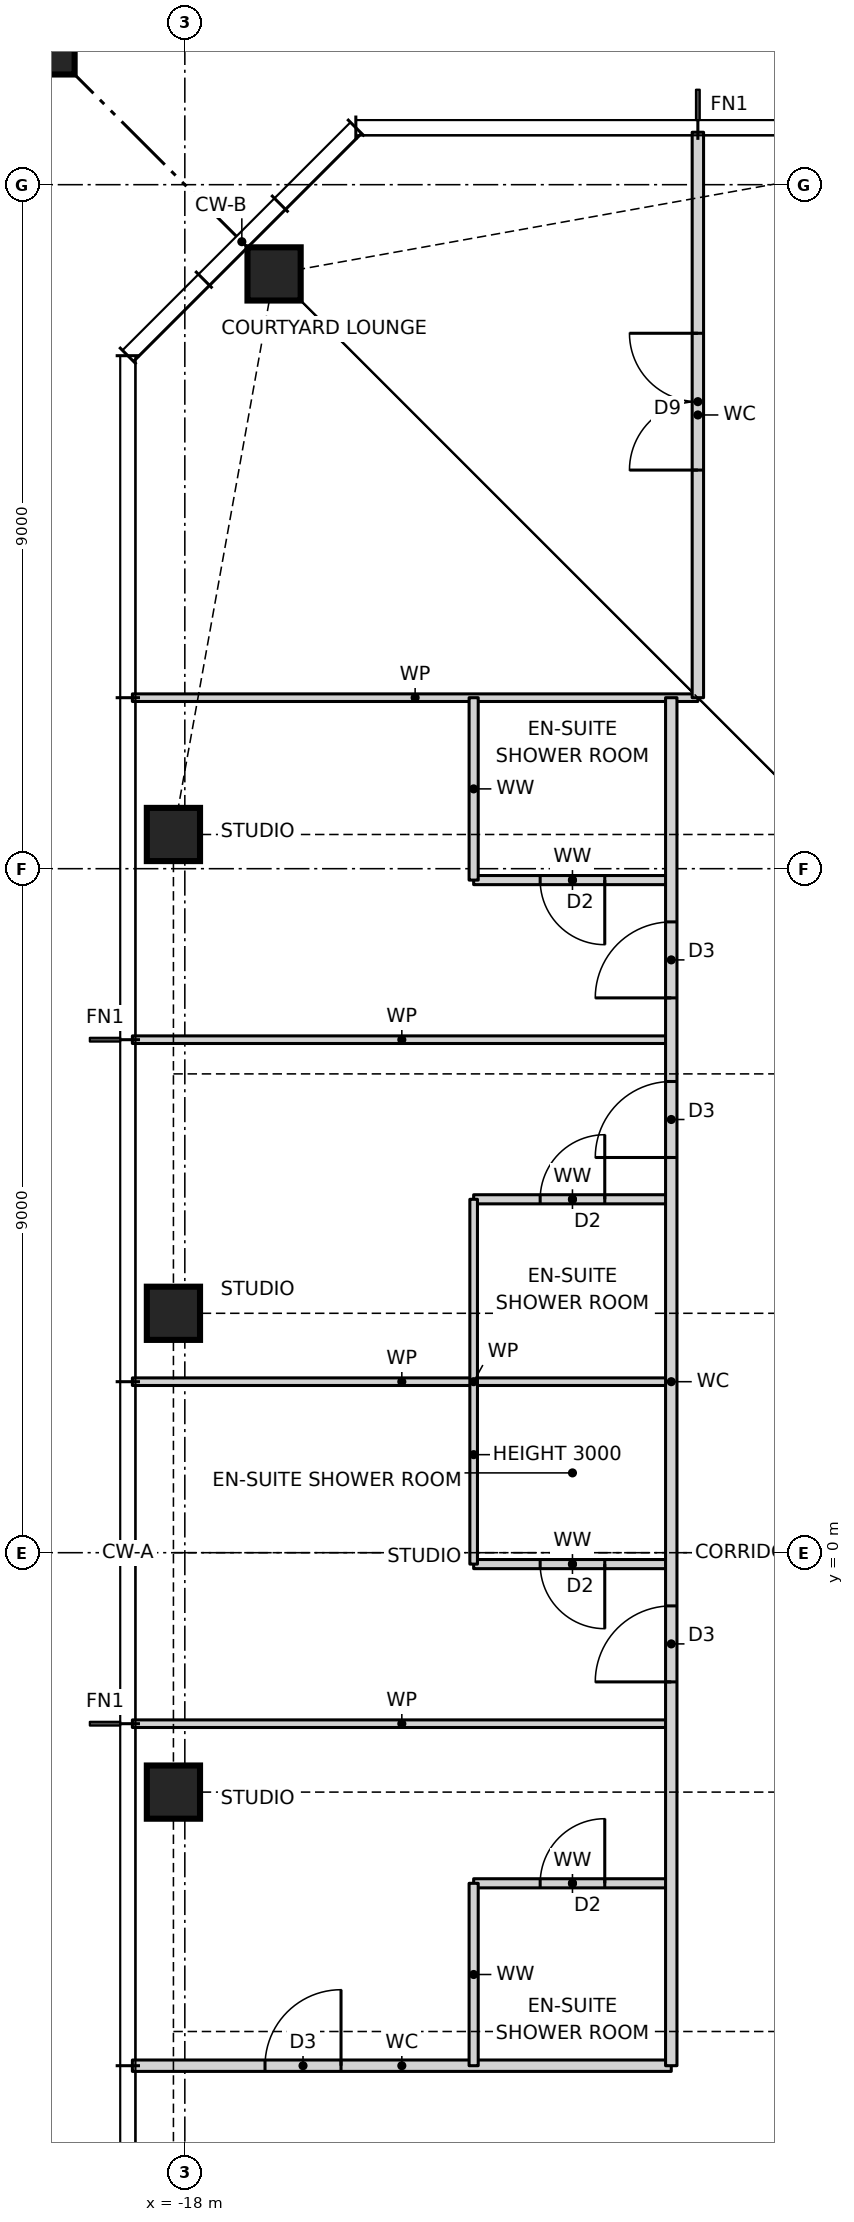
"""IFC4 building model, lengths in metres.
Left out: names, types, materials, properties, quantities, classifications, styles, units other than length and angle.
Written with IfcOpenShell. Run it as: python <this file> out.ifc"""

import sys

from ifc_helpers import new_model, si_unit, direction, frame, frame_2d, origin, origin_2d, place, context, subcontext, project, spatial, rectangle, hollow_rectangle, i_section, extrude, element, fill, save


model = new_model("IFC4")
c1 = context("Model", 3, precision=1e-05, world=origin(), true_north=direction((0.0, 1.0)))
c2 = subcontext(c1, "Body", "Model", "MODEL_VIEW")
j1 = project(units=[si_unit("LENGTHUNIT", "METRE"), si_unit("PLANEANGLEUNIT", "RADIAN")], contexts=[c1])
p1 = place(None, origin())
s1 = spatial("IfcSite", under=j1, at=p1, CompositionType="ELEMENT")
p2 = place(p1, origin())
s2 = spatial("IfcBuilding", under=s1, at=p2, CompositionType="ELEMENT")
p3 = place(p2, frame((0.0, 0.0, 153.0)))
s3 = spatial("IfcBuildingStorey", under=s2, at=p3, CompositionType="ELEMENT", Elevation=153.0)
for number, where, z_axis, x_axis in (
    (1, (-16.826, 16.826, 0.0), (0.0, 0.0, 1.0), (1.0, 0.0, 0.0)),
    (2, (-18.15, 9.45, 0.0), (0.0, 0.0, 1.0), (1.0, 0.0, 0.0)),
    (3, (-18.15, 3.15, 0.0), (0.0, 0.0, 1.0), (1.0, 0.0, 0.0)),
    (4, (-18.15, -3.15, 0.0), (0.0, 0.0, 1.0), (1.0, 0.0, 0.0)),
):
    element("IfcColumn", number, at=place(p3, frame(where, z_axis=z_axis, x_axis=x_axis)), inside=s3, PredefinedType="COLUMN", context=c2, shape_type="SweptSolid", body=[
        extrude(hollow_rectangle(XDim=0.7, YDim=0.7, WallThickness=0.06, at=origin_2d()), origin(), (0.0, 0.0, 1.0), 3.5),
    ])
p4 = place(p3, frame((-21.65, 21.65, 0.0), z_axis=(0.0, 0.0, 1.0), x_axis=(1.0, 0.0, 0.0)))
e5 = element("IfcColumn", 5, at=p4, inside=s3, PredefinedType="COLUMN", context=c2, shape_type="SweptSolid", body=[
    extrude(rectangle(XDim=4.4, YDim=4.4, at=origin_2d()), origin(), (0.0, 0.0, 1.0), 3.5),
    extrude(i_section(OverallWidth=0.478, OverallDepth=0.599, WebThickness=0.1, FlangeThickness=0.14, at=origin_2d()), origin(), (0.0, 0.0, 1.0), 3.5),
])
p5 = place(p3, frame((-18.69, -6.75, 0.0), z_axis=(0.0, 0.0, 1.0), x_axis=(1.0, 0.0, 0.0)))
e6 = element("IfcWall", 6, at=p5, inside=s3, PredefinedType="PARTITIONING", context=c2, shape_type="SweptSolid", body=[
    extrude(rectangle(XDim=7.09, YDim=0.15, at=frame_2d((3.545, 0.0))), origin(), (0.0, 0.0, 1.0), 3.27),
])
p6 = place(p5, frame((1.745, 0.0, 0.0)))
e7 = element("IfcOpeningElement", 7, at=p6, cuts=e6, PredefinedType="OPENING", context=c2, shape_type="SweptSolid", body=[
    extrude(rectangle(XDim=1.0, YDim=2.1, at=frame_2d((0.5, 1.05))), frame((0.0, 0.085, 0.0), z_axis=(0.0, -1.0, 0.0), x_axis=(1.0, 0.0, 0.0)), (0.0, 0.0, 1.0), 0.17),
])
p7 = place(p3, frame((-14.2, -4.35, 0.0), z_axis=(0.0, 0.0, 1.0), x_axis=(1.0, 0.0, 0.0)))
e8 = element("IfcWall", 8, at=p7, inside=s3, PredefinedType="PARTITIONING", context=c2, shape_type="SweptSolid", body=[
    extrude(rectangle(XDim=2.6, YDim=0.12, at=frame_2d((1.3, 0.0))), origin(), (0.0, 0.0, 1.0), 3.27),
])
p8 = place(p7, frame((0.875, 0.0, 0.0)))
e9 = element("IfcOpeningElement", 9, at=p8, cuts=e8, PredefinedType="OPENING", context=c2, shape_type="SweptSolid", body=[
    extrude(rectangle(XDim=0.85, YDim=2.1, at=frame_2d((0.425, 1.05))), frame((0.0, 0.07, 0.0), z_axis=(0.0, -1.0, 0.0), x_axis=(1.0, 0.0, 0.0)), (0.0, 0.0, 1.0), 0.14),
])
p9 = place(p3, frame((-18.69, -2.25, 0.0), z_axis=(0.0, 0.0, 1.0), x_axis=(1.0, 0.0, 0.0)))
e10 = element("IfcWall", 10, at=p9, inside=s3, PredefinedType="PARTITIONING", context=c2, shape_type="SweptSolid", body=[
    extrude(rectangle(XDim=7.09, YDim=0.1, at=frame_2d((3.545, 0.0))), origin(), (0.0, 0.0, 1.0), 3.27),
])
p10 = place(p3, frame((-14.2, -0.15, 0.0), z_axis=(0.0, 0.0, 1.0), x_axis=(1.0, 0.0, 0.0)))
e11 = element("IfcWall", 11, at=p10, inside=s3, PredefinedType="PARTITIONING", context=c2, shape_type="SweptSolid", body=[
    extrude(rectangle(XDim=2.6, YDim=0.12, at=frame_2d((1.3, 0.0))), origin(), (0.0, 0.0, 1.0), 3.27),
])
p11 = place(p10, frame((0.875, 0.0, 0.0)))
e12 = element("IfcOpeningElement", 12, at=p11, cuts=e11, PredefinedType="OPENING", context=c2, shape_type="SweptSolid", body=[
    extrude(rectangle(XDim=0.85, YDim=2.1, at=frame_2d((0.425, 1.05))), frame((0.0, 0.07, 0.0), z_axis=(0.0, -1.0, 0.0), x_axis=(1.0, 0.0, 0.0)), (0.0, 0.0, 1.0), 0.14),
])
p12 = place(p3, frame((-18.69, 2.25, 0.0), z_axis=(0.0, 0.0, 1.0), x_axis=(1.0, 0.0, 0.0)))
e13 = element("IfcWall", 13, at=p12, inside=s3, PredefinedType="PARTITIONING", context=c2, shape_type="SweptSolid", body=[
    extrude(rectangle(XDim=7.09, YDim=0.1, at=frame_2d((3.545, 0.0))), origin(), (0.0, 0.0, 1.0), 3.27),
])
p13 = place(p3, frame((-14.2, 4.65, 0.0), z_axis=(0.0, 0.0, 1.0), x_axis=(1.0, 0.0, 0.0)))
e14 = element("IfcWall", 14, at=p13, inside=s3, PredefinedType="PARTITIONING", context=c2, shape_type="SweptSolid", body=[
    extrude(rectangle(XDim=2.6, YDim=0.12, at=frame_2d((1.3, 0.0))), origin(), (0.0, 0.0, 1.0), 3.27),
])
p14 = place(p13, frame((0.875, 0.0, 0.0)))
e15 = element("IfcOpeningElement", 15, at=p14, cuts=e14, PredefinedType="OPENING", context=c2, shape_type="SweptSolid", body=[
    extrude(rectangle(XDim=0.85, YDim=2.1, at=frame_2d((0.425, 1.05))), frame((0.0, 0.07, 0.0), z_axis=(0.0, -1.0, 0.0), x_axis=(1.0, 0.0, 0.0)), (0.0, 0.0, 1.0), 0.14),
])
p15 = place(p3, frame((-18.69, 6.75, 0.0), z_axis=(0.0, 0.0, 1.0), x_axis=(1.0, 0.0, 0.0)))
e16 = element("IfcWall", 16, at=p15, inside=s3, PredefinedType="PARTITIONING", context=c2, shape_type="SweptSolid", body=[
    extrude(rectangle(XDim=7.09, YDim=0.1, at=frame_2d((3.545, 0.0))), origin(), (0.0, 0.0, 1.0), 3.27),
])
p16 = place(p3, frame((-14.2, 8.85, 0.0), z_axis=(0.0, 0.0, 1.0), x_axis=(1.0, 0.0, 0.0)))
e17 = element("IfcWall", 17, at=p16, inside=s3, PredefinedType="PARTITIONING", context=c2, shape_type="SweptSolid", body=[
    extrude(rectangle(XDim=2.6, YDim=0.12, at=frame_2d((1.3, 0.0))), origin(), (0.0, 0.0, 1.0), 3.27),
])
p17 = place(p16, frame((0.875, 0.0, 0.0)))
e18 = element("IfcOpeningElement", 18, at=p17, cuts=e17, PredefinedType="OPENING", context=c2, shape_type="SweptSolid", body=[
    extrude(rectangle(XDim=0.85, YDim=2.1, at=frame_2d((0.425, 1.05))), frame((0.0, 0.07, 0.0), z_axis=(0.0, -1.0, 0.0), x_axis=(1.0, 0.0, 0.0)), (0.0, 0.0, 1.0), 0.14),
])
p18 = place(p3, frame((-18.69, 11.25, 0.0), z_axis=(0.0, 0.0, 1.0), x_axis=(1.0, 0.0, 0.0)))
e19 = element("IfcWall", 19, at=p18, inside=s3, PredefinedType="PARTITIONING", context=c2, shape_type="SweptSolid", body=[
    extrude(rectangle(XDim=7.44, YDim=0.1, at=frame_2d((3.72, 0.0))), origin(), (0.0, 0.0, 1.0), 3.27),
])
p19 = place(p3, frame((-11.25, 11.25, 0.0), z_axis=(0.0, 0.0, 1.0), x_axis=(0.0, 1.0, 0.0)))
e20 = element("IfcWall", 20, at=p19, inside=s3, PredefinedType="PARTITIONING", context=c2, shape_type="SweptSolid", body=[
    extrude(rectangle(XDim=7.44, YDim=0.15, at=frame_2d((3.72, 0.0))), origin(), (0.0, 0.0, 1.0), 3.27),
])
p20 = place(p19, frame((2.995, 0.0, 0.0)))
e21 = element("IfcOpeningElement", 21, at=p20, cuts=e20, PredefinedType="OPENING", context=c2, shape_type="SweptSolid", body=[
    extrude(rectangle(XDim=1.8, YDim=2.1, at=frame_2d((0.9, 1.05))), frame((0.0, 0.085, 0.0), z_axis=(0.0, -1.0, 0.0), x_axis=(1.0, 0.0, 0.0)), (0.0, 0.0, 1.0), 0.17),
])
p21 = place(p3, frame((-11.6, -6.75, 0.0), z_axis=(0.0, 0.0, 1.0), x_axis=(0.0, 1.0, 0.0)))
e22 = element("IfcWall", 22, at=p21, inside=s3, PredefinedType="PARTITIONING", context=c2, shape_type="SweptSolid", body=[
    extrude(rectangle(XDim=18.0, YDim=0.15, at=frame_2d((9.0, 0.0))), origin(), (0.0, 0.0, 1.0), 3.27),
])
p22 = place(p21, frame((14.05, 0.0, 0.0)))
e23 = element("IfcOpeningElement", 23, at=p22, cuts=e22, PredefinedType="OPENING", context=c2, shape_type="SweptSolid", body=[
    extrude(rectangle(XDim=1.0, YDim=2.1, at=frame_2d((0.5, 1.05))), frame((0.0, 0.085, 0.0), z_axis=(0.0, -1.0, 0.0), x_axis=(1.0, 0.0, 0.0)), (0.0, 0.0, 1.0), 0.17),
])
p23 = place(p21, frame((11.95, 0.0, 0.0)))
e24 = element("IfcOpeningElement", 24, at=p23, cuts=e22, PredefinedType="OPENING", context=c2, shape_type="SweptSolid", body=[
    extrude(rectangle(XDim=1.0, YDim=2.1, at=frame_2d((0.5, 1.05))), frame((0.0, 0.085, 0.0), z_axis=(0.0, -1.0, 0.0), x_axis=(1.0, 0.0, 0.0)), (0.0, 0.0, 1.0), 0.17),
])
p24 = place(p21, frame((5.05, 0.0, 0.0)))
e25 = element("IfcOpeningElement", 25, at=p24, cuts=e22, PredefinedType="OPENING", context=c2, shape_type="SweptSolid", body=[
    extrude(rectangle(XDim=1.0, YDim=2.1, at=frame_2d((0.5, 1.05))), frame((0.0, 0.085, 0.0), z_axis=(0.0, -1.0, 0.0), x_axis=(1.0, 0.0, 0.0)), (0.0, 0.0, 1.0), 0.17),
])
p25 = place(p3, frame((-14.2, -6.75, 0.0), z_axis=(0.0, 0.0, 1.0), x_axis=(0.0, 1.0, 0.0)))
e26 = element("IfcWall", 26, at=p25, inside=s3, PredefinedType="PARTITIONING", context=c2, shape_type="SweptSolid", body=[
    extrude(rectangle(XDim=2.4, YDim=0.12, at=frame_2d((1.2, 0.0))), origin(), (0.0, 0.0, 1.0), 3.27),
])
p26 = place(p3, frame((-14.2, -0.15, 0.0), z_axis=(0.0, 0.0, 1.0), x_axis=(0.0, 1.0, 0.0)))
e27 = element("IfcWall", 27, at=p26, inside=s3, PredefinedType="PARTITIONING", context=c2, shape_type="SweptSolid", body=[
    extrude(rectangle(XDim=4.8, YDim=0.1, at=frame_2d((2.4, 0.0))), origin(), (0.0, 0.0, 1.0), 3.0),
])
p27 = place(p3, frame((-14.2, 8.85, 0.0), z_axis=(0.0, 0.0, 1.0), x_axis=(0.0, 1.0, 0.0)))
e28 = element("IfcWall", 28, at=p27, inside=s3, PredefinedType="PARTITIONING", context=c2, shape_type="SweptSolid", body=[
    extrude(rectangle(XDim=2.4, YDim=0.12, at=frame_2d((1.2, 0.0))), origin(), (0.0, 0.0, 1.0), 3.27),
])
p28 = place(p22, origin())
e29 = element("IfcDoor", 29, at=p28, inside=s3, OperationType="SINGLE_SWING_LEFT", PredefinedType="DOOR", context=c2, shape_type="SweptSolid", body=[
    extrude(rectangle(XDim=1.0, YDim=2.1, at=frame_2d((0.5, 1.05))), frame((0.0, 0.025, 0.0), z_axis=(0.0, -1.0, 0.0), x_axis=(1.0, 0.0, 0.0)), (0.0, 0.0, 1.0), 0.05),
])
fill(e23, e29)
p29 = place(p17, frame((0.85, 0.0, 0.0), z_axis=(0.0, 0.0, 1.0), x_axis=(-1.0, 0.0, 0.0)))
e30 = element("IfcDoor", 30, at=p29, inside=s3, OperationType="SINGLE_SWING_LEFT", PredefinedType="DOOR", context=c2, shape_type="SweptSolid", body=[
    extrude(rectangle(XDim=0.85, YDim=2.1, at=frame_2d((0.425, 1.05))), frame((0.0, 0.025, 0.0), z_axis=(0.0, -1.0, 0.0), x_axis=(1.0, 0.0, 0.0)), (0.0, 0.0, 1.0), 0.05),
])
fill(e18, e30)
p30 = place(p23, origin())
e31 = element("IfcDoor", 31, at=p30, inside=s3, OperationType="SINGLE_SWING_LEFT", PredefinedType="DOOR", context=c2, shape_type="SweptSolid", body=[
    extrude(rectangle(XDim=1.0, YDim=2.1, at=frame_2d((0.5, 1.05))), frame((0.0, 0.025, 0.0), z_axis=(0.0, -1.0, 0.0), x_axis=(1.0, 0.0, 0.0)), (0.0, 0.0, 1.0), 0.05),
])
fill(e24, e31)
p31 = place(p14, origin())
e32 = element("IfcDoor", 32, at=p31, inside=s3, OperationType="SINGLE_SWING_RIGHT", PredefinedType="DOOR", context=c2, shape_type="SweptSolid", body=[
    extrude(rectangle(XDim=0.85, YDim=2.1, at=frame_2d((0.425, 1.05))), frame((0.0, 0.025, 0.0), z_axis=(0.0, -1.0, 0.0), x_axis=(1.0, 0.0, 0.0)), (0.0, 0.0, 1.0), 0.05),
])
fill(e15, e32)
p32 = place(p24, origin())
e33 = element("IfcDoor", 33, at=p32, inside=s3, OperationType="SINGLE_SWING_LEFT", PredefinedType="DOOR", context=c2, shape_type="SweptSolid", body=[
    extrude(rectangle(XDim=1.0, YDim=2.1, at=frame_2d((0.5, 1.05))), frame((0.0, 0.025, 0.0), z_axis=(0.0, -1.0, 0.0), x_axis=(1.0, 0.0, 0.0)), (0.0, 0.0, 1.0), 0.05),
])
fill(e25, e33)
p33 = place(p11, frame((0.85, 0.0, 0.0), z_axis=(0.0, 0.0, 1.0), x_axis=(-1.0, 0.0, 0.0)))
e34 = element("IfcDoor", 34, at=p33, inside=s3, OperationType="SINGLE_SWING_LEFT", PredefinedType="DOOR", context=c2, shape_type="SweptSolid", body=[
    extrude(rectangle(XDim=0.85, YDim=2.1, at=frame_2d((0.425, 1.05))), frame((0.0, 0.025, 0.0), z_axis=(0.0, -1.0, 0.0), x_axis=(1.0, 0.0, 0.0)), (0.0, 0.0, 1.0), 0.05),
])
fill(e12, e34)
p34 = place(p6, origin())
e35 = element("IfcDoor", 35, at=p34, inside=s3, OperationType="SINGLE_SWING_RIGHT", PredefinedType="DOOR", context=c2, shape_type="SweptSolid", body=[
    extrude(rectangle(XDim=1.0, YDim=2.1, at=frame_2d((0.5, 1.05))), frame((0.0, 0.025, 0.0), z_axis=(0.0, -1.0, 0.0), x_axis=(1.0, 0.0, 0.0)), (0.0, 0.0, 1.0), 0.05),
])
fill(e7, e35)
p35 = place(p8, origin())
e36 = element("IfcDoor", 36, at=p35, inside=s3, OperationType="SINGLE_SWING_RIGHT", PredefinedType="DOOR", context=c2, shape_type="SweptSolid", body=[
    extrude(rectangle(XDim=0.85, YDim=2.1, at=frame_2d((0.425, 1.05))), frame((0.0, 0.025, 0.0), z_axis=(0.0, -1.0, 0.0), x_axis=(1.0, 0.0, 0.0)), (0.0, 0.0, 1.0), 0.05),
])
fill(e9, e36)
p36 = place(p20, origin())
e37 = element("IfcDoor", 37, at=p36, inside=s3, OperationType="DOUBLE_DOOR_SINGLE_SWING", PredefinedType="DOOR", context=c2, shape_type="SweptSolid", body=[
    extrude(rectangle(XDim=1.8, YDim=2.1, at=frame_2d((0.9, 1.05))), frame((0.0, 0.025, 0.0), z_axis=(0.0, -1.0, 0.0), x_axis=(1.0, 0.0, 0.0)), (0.0, 0.0, 1.0), 0.05),
])
fill(e21, e37)
save(model, sys.argv[1])
